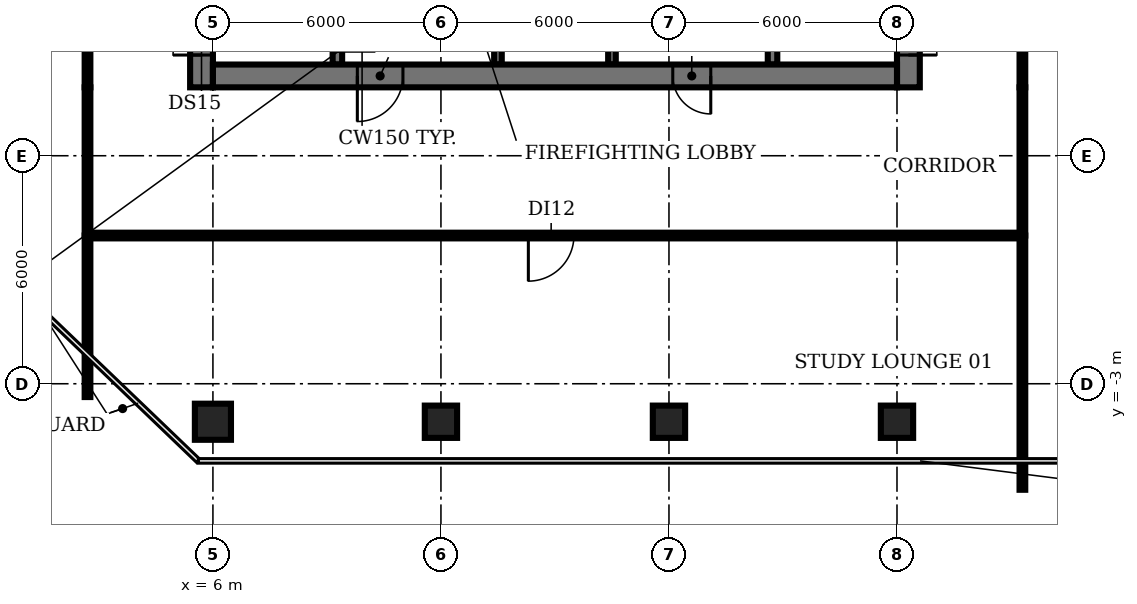
"""IFC4 building model, lengths in metres.
Left out: names, types, materials, properties, quantities, classifications, styles, units other than length and angle.
Written with IfcOpenShell. Run it as: python <this file> out.ifc"""

import sys

from ifc_helpers import new_model, si_unit, direction, frame, frame_2d, origin, origin_2d, place, context, subcontext, project, spatial, rectangle, circle, extrude, element, fill, save


model = new_model("IFC4")
c1 = context("Model", 3, precision=1e-05, world=origin(), true_north=direction((0.0, 1.0)))
c2 = subcontext(c1, "Body", "Model", "MODEL_VIEW")
j1 = project(units=[si_unit("LENGTHUNIT", "METRE"), si_unit("PLANEANGLEUNIT", "RADIAN")], contexts=[c1])
p1 = place(None, origin())
s1 = spatial("IfcSite", under=j1, at=p1, CompositionType="ELEMENT")
p2 = place(p1, origin())
s2 = spatial("IfcBuilding", under=s1, at=p2, CompositionType="ELEMENT")
p3 = place(p2, frame((0.0, 0.0, 150.8)))
s3 = spatial("IfcBuildingStorey", under=s2, at=p3, CompositionType="ELEMENT", Elevation=150.8)
p4 = place(p3, frame((6.0, -4.0, 0.0), z_axis=(0.0, 0.0, 1.0), x_axis=(1.0, 0.0, 0.0)))
e1 = element("IfcColumn", 1, at=p4, inside=s3, PredefinedType="COLUMN", context=c2, shape_type="SweptSolid", body=[
    extrude(circle(Radius=0.475, at=origin_2d()), origin(), (0.0, 0.0, 1.0), 3.85),
])
for number, where, z_axis, x_axis in (
    (2, (12.0, -4.0, 0.0), (0.0, 0.0, 1.0), (1.0, 0.0, 0.0)),
    (3, (18.0, -4.0, 0.0), (0.0, 0.0, 1.0), (1.0, 0.0, 0.0)),
    (4, (24.0, -4.0, 0.0), (0.0, 0.0, 1.0), (1.0, 0.0, 0.0)),
):
    element("IfcColumn", number, at=place(p3, frame(where, z_axis=z_axis, x_axis=x_axis)), inside=s3, PredefinedType="COLUMN", context=c2, shape_type="SweptSolid", body=[
        extrude(rectangle(XDim=0.85, YDim=0.85, at=origin_2d()), origin(), (0.0, 0.0, 1.0), 3.85),
    ])
p5 = place(p3, frame((9.275, 11.825, 0.0), z_axis=(0.0, 0.0, 1.0), x_axis=(0.0, -1.0, 0.0)))
e5 = element("IfcWall", 5, at=p5, inside=s3, PredefinedType="SHEAR", context=c2, shape_type="SweptSolid", body=[
    extrude(rectangle(XDim=6.425, YDim=0.25, at=frame_2d((3.212, 0.0))), origin(), (0.0, 0.0, 1.0), 3.85),
])
p6 = place(p5, frame((5.075, 0.0, 0.0)))
e6 = element("IfcOpeningElement", 6, at=p6, cuts=e5, PredefinedType="OPENING", context=c2, shape_type="SweptSolid", body=[
    extrude(rectangle(XDim=1.0, YDim=2.1, at=frame_2d((0.5, 1.05))), frame((0.0, 0.135, 0.0), z_axis=(0.0, -1.0, 0.0), x_axis=(1.0, 0.0, 0.0)), (0.0, 0.0, 1.0), 0.27),
])
p7 = place(p3, frame((13.5, 5.4, 0.0), z_axis=(0.0, 0.0, 1.0), x_axis=(0.0, 1.0, 0.0)))
e7 = element("IfcWall", 7, at=p7, inside=s3, PredefinedType="SHEAR", context=c2, shape_type="SweptSolid", body=[
    extrude(rectangle(XDim=8.2, YDim=0.2, at=frame_2d((4.1, 0.0))), origin(), (0.0, 0.0, 1.0), 3.85),
])
p8 = place(p7, frame((0.75, 0.0, 0.0)))
e8 = element("IfcOpeningElement", 8, at=p8, cuts=e7, PredefinedType="OPENING", context=c2, shape_type="SweptSolid", body=[
    extrude(rectangle(XDim=1.1, YDim=2.1, at=frame_2d((0.55, 1.05))), frame((0.0, 0.11, 0.0), z_axis=(0.0, -1.0, 0.0), x_axis=(1.0, 0.0, 0.0)), (0.0, 0.0, 1.0), 0.22),
])
p9 = place(p7, frame((3.55, 0.0, 0.0)))
e9 = element("IfcOpeningElement", 9, at=p9, cuts=e7, PredefinedType="OPENING", context=c2, shape_type="SweptSolid", body=[
    extrude(rectangle(XDim=1.1, YDim=2.1, at=frame_2d((0.55, 1.05))), frame((0.0, 0.11, 0.0), z_axis=(0.0, -1.0, 0.0), x_axis=(1.0, 0.0, 0.0)), (0.0, 0.0, 1.0), 0.22),
])
p10 = place(p7, frame((6.35, 0.0, 0.0)))
e10 = element("IfcOpeningElement", 10, at=p10, cuts=e7, PredefinedType="OPENING", context=c2, shape_type="SweptSolid", body=[
    extrude(rectangle(XDim=1.1, YDim=2.1, at=frame_2d((0.55, 1.05))), frame((0.0, 0.11, 0.0), z_axis=(0.0, -1.0, 0.0), x_axis=(1.0, 0.0, 0.0)), (0.0, 0.0, 1.0), 0.22),
])
p11 = place(p3, frame((16.5, 5.4, 0.0), z_axis=(0.0, 0.0, 1.0), x_axis=(0.0, 1.0, 0.0)))
e11 = element("IfcWall", 11, at=p11, inside=s3, PredefinedType="SHEAR", context=c2, shape_type="SweptSolid", body=[
    extrude(rectangle(XDim=8.2, YDim=0.2, at=frame_2d((4.1, 0.0))), origin(), (0.0, 0.0, 1.0), 3.85),
])
p12 = place(p3, frame((20.725, 5.4, 0.0), z_axis=(0.0, 0.0, 1.0), x_axis=(0.0, 1.0, 0.0)))
e12 = element("IfcWall", 12, at=p12, inside=s3, PredefinedType="SHEAR", context=c2, shape_type="SweptSolid", body=[
    extrude(rectangle(XDim=6.3, YDim=0.25, at=frame_2d((3.15, 0.0))), origin(), (0.0, 0.0, 1.0), 3.85),
])
p13 = place(p3, frame((5.7, 4.8, 0.0), z_axis=(0.0, 0.0, 1.0), x_axis=(0.0, 1.0, 0.0)))
e13 = element("IfcWall", 13, at=p13, inside=s3, PredefinedType="SHEAR", context=c2, shape_type="SweptSolid", body=[
    extrude(rectangle(XDim=20.6, YDim=0.6, at=frame_2d((10.3, 0.0))), origin(), (0.0, 0.0, 1.0), 3.85),
])
p14 = place(p13, frame((0.85, 0.0, 0.0)))
e14 = element("IfcOpeningElement", 14, at=p14, cuts=e13, PredefinedType="OPENING", context=c2, shape_type="SweptSolid", body=[
    extrude(rectangle(XDim=1.5, YDim=2.1, at=frame_2d((0.75, 1.05))), frame((0.0, 0.31, 0.0), z_axis=(0.0, -1.0, 0.0), x_axis=(1.0, 0.0, 0.0)), (0.0, 0.0, 1.0), 0.62),
])
p15 = place(p13, frame((7.3, 0.0, 0.0)))
e15 = element("IfcOpeningElement", 15, at=p15, cuts=e13, PredefinedType="OPENING", context=c2, shape_type="SweptSolid", body=[
    extrude(rectangle(XDim=1.2, YDim=2.1, at=frame_2d((0.6, 1.05))), frame((0.0, 0.31, 0.0), z_axis=(0.0, -1.0, 0.0), x_axis=(1.0, 0.0, 0.0)), (0.0, 0.0, 1.0), 0.62),
])
p16 = place(p13, frame((13.85, 0.0, 0.0)))
e16 = element("IfcOpeningElement", 16, at=p16, cuts=e13, PredefinedType="OPENING", context=c2, shape_type="SweptSolid", body=[
    extrude(rectangle(XDim=1.2, YDim=2.1, at=frame_2d((0.6, 1.05))), frame((0.0, 0.31, 0.0), z_axis=(0.0, -1.0, 0.0), x_axis=(1.0, 0.0, 0.0)), (0.0, 0.0, 1.0), 0.62),
])
p17 = place(p3, frame((24.3, 25.555, 0.0), z_axis=(0.0, 0.0, 1.0), x_axis=(0.0, -1.0, 0.0)))
e17 = element("IfcWall", 17, at=p17, inside=s3, PredefinedType="SHEAR", context=c2, shape_type="SweptSolid", body=[
    extrude(rectangle(XDim=20.755, YDim=0.6, at=frame_2d((10.377, 0.0))), origin(), (0.0, 0.0, 1.0), 3.85),
])
p18 = place(p17, frame((18.405, 0.0, 0.0)))
e18 = element("IfcOpeningElement", 18, at=p18, cuts=e17, PredefinedType="OPENING", context=c2, shape_type="SweptSolid", body=[
    extrude(rectangle(XDim=1.5, YDim=2.1, at=frame_2d((0.75, 1.05))), frame((0.0, 0.31, 0.0), z_axis=(0.0, -1.0, 0.0), x_axis=(1.0, 0.0, 0.0)), (0.0, 0.0, 1.0), 0.62),
])
p19 = place(p17, frame((12.305, 0.0, 0.0)))
e19 = element("IfcOpeningElement", 19, at=p19, cuts=e17, PredefinedType="OPENING", context=c2, shape_type="SweptSolid", body=[
    extrude(rectangle(XDim=0.9, YDim=2.1, at=frame_2d((0.45, 1.05))), frame((0.0, 0.31, 0.0), z_axis=(0.0, -1.0, 0.0), x_axis=(1.0, 0.0, 0.0)), (0.0, 0.0, 1.0), 0.62),
])
p20 = place(p17, frame((6.305, 0.0, 0.0)))
e20 = element("IfcOpeningElement", 20, at=p20, cuts=e17, PredefinedType="OPENING", context=c2, shape_type="SweptSolid", body=[
    extrude(rectangle(XDim=2.0, YDim=2.1, at=frame_2d((1.0, 1.05))), frame((0.0, 0.31, 0.0), z_axis=(0.0, -1.0, 0.0), x_axis=(1.0, 0.0, 0.0)), (0.0, 0.0, 1.0), 0.62),
])
p21 = place(p3, frame((24.0, 5.1, 0.0), z_axis=(0.0, 0.0, 1.0), x_axis=(-1.0, 0.0, 0.0)))
e21 = element("IfcWall", 21, at=p21, inside=s3, PredefinedType="SHEAR", context=c2, shape_type="SweptSolid", body=[
    extrude(rectangle(XDim=18.0, YDim=0.6, at=frame_2d((9.0, 0.0))), origin(), (0.0, 0.0, 1.0), 3.85),
])
p22 = place(p21, frame((13.0, 0.0, 0.0)))
e22 = element("IfcOpeningElement", 22, at=p22, cuts=e21, PredefinedType="OPENING", context=c2, shape_type="SweptSolid", body=[
    extrude(rectangle(XDim=1.2, YDim=2.1, at=frame_2d((0.6, 1.05))), frame((0.0, 0.31, 0.0), z_axis=(0.0, -1.0, 0.0), x_axis=(1.0, 0.0, 0.0)), (0.0, 0.0, 1.0), 0.62),
])
p23 = place(p21, frame((4.9, 0.0, 0.0)))
e23 = element("IfcOpeningElement", 23, at=p23, cuts=e21, PredefinedType="OPENING", context=c2, shape_type="SweptSolid", body=[
    extrude(rectangle(XDim=1.0, YDim=2.1, at=frame_2d((0.5, 1.05))), frame((0.0, 0.31, 0.0), z_axis=(0.0, -1.0, 0.0), x_axis=(1.0, 0.0, 0.0)), (0.0, 0.0, 1.0), 0.62),
])
p24 = place(p3, frame((2.7, -3.35, 0.0), z_axis=(0.0, 0.0, 1.0), x_axis=(0.0, 1.0, 0.0)))
e24 = element("IfcWall", 24, at=p24, inside=s3, PredefinedType="PARTITIONING", context=c2, shape_type="SweptSolid", body=[
    extrude(rectangle(XDim=4.25, YDim=0.15, at=frame_2d((2.125, 0.0))), origin(), (0.0, 0.0, 1.0), 2.88),
])
p25 = place(p3, frame((2.7, 0.9, 0.0), z_axis=(0.0, 0.0, 1.0), x_axis=(0.0, 1.0, 0.0)))
e25 = element("IfcWall", 25, at=p25, inside=s3, PredefinedType="PARTITIONING", context=c2, shape_type="SweptSolid", body=[
    extrude(rectangle(XDim=3.9, YDim=0.15, at=frame_2d((1.95, 0.0))), origin(), (0.0, 0.0, 1.0), 2.88),
])
p26 = place(p3, frame((2.7, 4.8, 0.0), z_axis=(0.0, 0.0, 1.0), x_axis=(0.0, 1.0, 0.0)))
e26 = element("IfcWall", 26, at=p26, inside=s3, PredefinedType="PARTITIONING", context=c2, shape_type="SweptSolid", body=[
    extrude(rectangle(XDim=20.6, YDim=0.15, at=frame_2d((10.3, 0.0))), origin(), (0.0, 0.0, 1.0), 2.88),
])
p27 = place(p26, frame((10.2, 0.0, 0.0)))
e27 = element("IfcOpeningElement", 27, at=p27, cuts=e26, PredefinedType="OPENING", context=c2, shape_type="SweptSolid", body=[
    extrude(rectangle(XDim=1.2, YDim=2.1, at=frame_2d((0.6, 1.05))), frame((0.0, 0.085, 0.0), z_axis=(0.0, -1.0, 0.0), x_axis=(1.0, 0.0, 0.0)), (0.0, 0.0, 1.0), 0.17),
])
p28 = place(p3, frame((27.3, -5.79, 0.0), z_axis=(0.0, 0.0, 1.0), x_axis=(0.0, 1.0, 0.0)))
e28 = element("IfcWall", 28, at=p28, inside=s3, PredefinedType="PARTITIONING", context=c2, shape_type="SweptSolid", body=[
    extrude(rectangle(XDim=6.69, YDim=0.15, at=frame_2d((3.345, 0.0))), origin(), (0.0, 0.0, 1.0), 2.88),
])
p29 = place(p3, frame((27.3, 0.9, 0.0), z_axis=(0.0, 0.0, 1.0), x_axis=(-1.0, 0.0, 0.0)))
e29 = element("IfcWall", 29, at=p29, inside=s3, PredefinedType="PARTITIONING", context=c2, shape_type="SweptSolid", body=[
    extrude(rectangle(XDim=24.6, YDim=0.15, at=frame_2d((12.3, 0.0))), origin(), (0.0, 0.0, 1.0), 2.88),
])
p30 = place(p29, frame((11.8, 0.0, 0.0)))
e30 = element("IfcOpeningElement", 30, at=p30, cuts=e29, PredefinedType="OPENING", context=c2, shape_type="SweptSolid", body=[
    extrude(rectangle(XDim=1.2, YDim=2.1, at=frame_2d((0.6, 1.05))), frame((0.0, 0.085, 0.0), z_axis=(0.0, -1.0, 0.0), x_axis=(1.0, 0.0, 0.0)), (0.0, 0.0, 1.0), 0.17),
])
p31 = place(p3, frame((27.3, 0.9, 0.0), z_axis=(0.0, 0.0, 1.0), x_axis=(0.0, 1.0, 0.0)))
e31 = element("IfcWall", 31, at=p31, inside=s3, PredefinedType="PARTITIONING", context=c2, shape_type="SweptSolid", body=[
    extrude(rectangle(XDim=3.9, YDim=0.15, at=frame_2d((1.95, 0.0))), origin(), (0.0, 0.0, 1.0), 2.88),
])
p32 = place(p3, frame((27.3, 4.8, 0.0), z_axis=(0.0, 0.0, 1.0), x_axis=(0.0, 1.0, 0.0)))
e32 = element("IfcWall", 32, at=p32, inside=s3, PredefinedType="PARTITIONING", context=c2, shape_type="SweptSolid", body=[
    extrude(rectangle(XDim=10.0, YDim=0.15, at=frame_2d((5.0, 0.0))), origin(), (0.0, 0.0, 1.0), 2.88),
])
p33 = place(p32, frame((4.4, 0.0, 0.0)))
e33 = element("IfcOpeningElement", 33, at=p33, cuts=e32, PredefinedType="OPENING", context=c2, shape_type="SweptSolid", body=[
    extrude(rectangle(XDim=1.2, YDim=2.1, at=frame_2d((0.6, 1.05))), frame((0.0, 0.085, 0.0), z_axis=(0.0, -1.0, 0.0), x_axis=(1.0, 0.0, 0.0)), (0.0, 0.0, 1.0), 0.17),
])
p34 = place(p14, origin())
e34 = element("IfcDoor", 34, at=p34, inside=s3, OperationType="DOUBLE_DOOR_SINGLE_SWING", PredefinedType="DOOR", context=c2, shape_type="SweptSolid", body=[
    extrude(rectangle(XDim=1.5, YDim=2.1, at=frame_2d((0.75, 1.05))), frame((0.0, 0.025, 0.0), z_axis=(0.0, -1.0, 0.0), x_axis=(1.0, 0.0, 0.0)), (0.0, 0.0, 1.0), 0.05),
])
fill(e14, e34)
p35 = place(p18, origin())
e35 = element("IfcDoor", 35, at=p35, inside=s3, OperationType="DOUBLE_DOOR_SINGLE_SWING", PredefinedType="DOOR", context=c2, shape_type="SweptSolid", body=[
    extrude(rectangle(XDim=1.5, YDim=2.1, at=frame_2d((0.75, 1.05))), frame((0.0, 0.025, 0.0), z_axis=(0.0, -1.0, 0.0), x_axis=(1.0, 0.0, 0.0)), (0.0, 0.0, 1.0), 0.05),
])
fill(e18, e35)
p36 = place(p22, origin())
e36 = element("IfcDoor", 36, at=p36, inside=s3, OperationType="SINGLE_SWING_RIGHT", PredefinedType="DOOR", context=c2, shape_type="SweptSolid", body=[
    extrude(rectangle(XDim=1.2, YDim=2.1, at=frame_2d((0.6, 1.05))), frame((0.0, 0.025, 0.0), z_axis=(0.0, -1.0, 0.0), x_axis=(1.0, 0.0, 0.0)), (0.0, 0.0, 1.0), 0.05),
])
fill(e22, e36)
p37 = place(p23, origin())
e37 = element("IfcDoor", 37, at=p37, inside=s3, OperationType="SINGLE_SWING_LEFT", PredefinedType="DOOR", context=c2, shape_type="SweptSolid", body=[
    extrude(rectangle(XDim=1.0, YDim=2.1, at=frame_2d((0.5, 1.05))), frame((0.0, -0.24, 0.0), z_axis=(0.0, -1.0, 0.0), x_axis=(1.0, 0.0, 0.0)), (0.0, 0.0, 1.0), 0.05),
])
fill(e23, e37)
p38 = place(p30, origin())
e38 = element("IfcDoor", 38, at=p38, inside=s3, OperationType="SINGLE_SWING_RIGHT", PredefinedType="DOOR", context=c2, shape_type="SweptSolid", body=[
    extrude(rectangle(XDim=1.2, YDim=2.1, at=frame_2d((0.6, 1.05))), frame((0.0, 0.025, 0.0), z_axis=(0.0, -1.0, 0.0), x_axis=(1.0, 0.0, 0.0)), (0.0, 0.0, 1.0), 0.05),
])
fill(e30, e38)
save(model, sys.argv[1])
